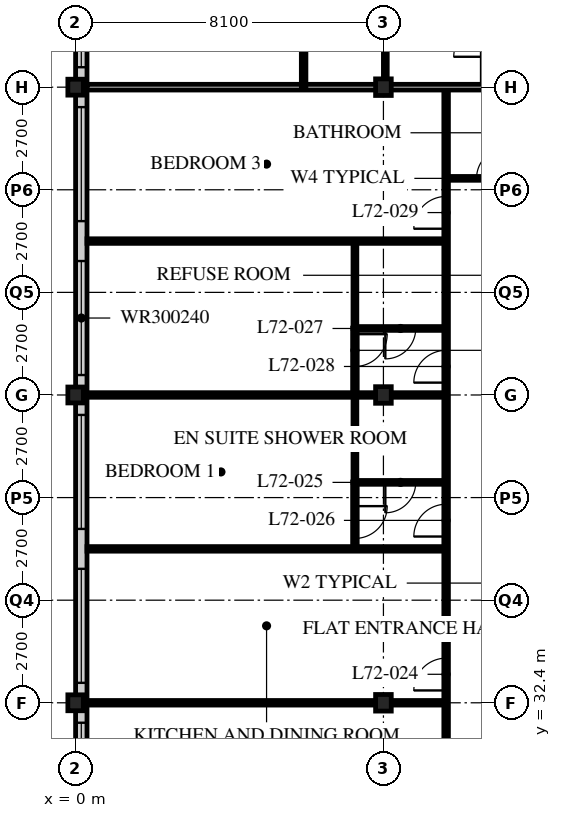
"""IFC4 building model, lengths in metres.
Left out: names, types, materials, properties, quantities, classifications, styles, units other than length and angle.
Written with IfcOpenShell. Run it as: python <this file> out.ifc"""

import sys

from ifc_helpers import new_model, si_unit, direction, frame, frame_2d, origin, origin_2d, place, context, subcontext, project, spatial, rectangle, i_section, extrude, element, fill, save


model = new_model("IFC4")
c1 = context("Model", 3, precision=1e-05, world=origin(), true_north=direction((0.0, 1.0)))
c2 = subcontext(c1, "Body", "Model", "MODEL_VIEW")
j1 = project(units=[si_unit("LENGTHUNIT", "METRE"), si_unit("PLANEANGLEUNIT", "RADIAN")], contexts=[c1])
p1 = place(None, origin())
s1 = spatial("IfcSite", under=j1, at=p1, CompositionType="ELEMENT")
p2 = place(p1, origin())
s2 = spatial("IfcBuilding", under=s1, at=p2, CompositionType="ELEMENT")
p3 = place(p2, frame((0.0, 0.0, 281.4)))
s3 = spatial("IfcBuildingStorey", under=s2, at=p3, CompositionType="ELEMENT", Elevation=281.4)
for number, where, z_axis, x_axis in (
    (1, (0.0, 32.4, 0.0), (0.0, 0.0, 1.0), (1.0, 0.0, 0.0)),
    (2, (0.0, 40.5, 0.0), (0.0, 0.0, 1.0), (1.0, 0.0, 0.0)),
    (3, (0.0, 48.6, 0.0), (0.0, 0.0, 1.0), (1.0, 0.0, 0.0)),
):
    element("IfcColumn", number, at=place(p3, frame(where, z_axis=z_axis, x_axis=x_axis)), inside=s3, PredefinedType="COLUMN", context=c2, shape_type="SweptSolid", body=[
        extrude(i_section(OverallWidth=0.407, OverallDepth=0.419, WebThickness=0.031, FlangeThickness=0.049, FilletRadius=0.015, at=origin_2d()), origin(), (0.0, 0.0, 1.0), 3.9),
    ])
for number, where, z_axis, x_axis in (
    (4, (8.1, 32.4, 0.0), (0.0, 0.0, 1.0), (1.0, 0.0, 0.0)),
    (5, (8.1, 40.5, 0.0), (0.0, 0.0, 1.0), (1.0, 0.0, 0.0)),
    (6, (8.1, 48.6, 0.0), (0.0, 0.0, 1.0), (1.0, 0.0, 0.0)),
):
    element("IfcColumn", number, at=place(p3, frame(where, z_axis=z_axis, x_axis=x_axis)), inside=s3, PredefinedType="COLUMN", context=c2, shape_type="SweptSolid", body=[
        extrude(i_section(OverallWidth=0.412, OverallDepth=0.437, WebThickness=0.036, FlangeThickness=0.058, FilletRadius=0.015, at=origin_2d()), origin(), (0.0, 0.0, 1.0), 3.9),
    ])
p4 = place(p3, frame((0.15, 56.4, 0.0), z_axis=(0.0, 0.0, 1.0), x_axis=(0.0, -1.0, 0.0)))
e7 = element("IfcWall", 7, at=p4, inside=s3, PredefinedType="SOLIDWALL", context=c2, shape_type="SweptSolid", body=[
    extrude(rectangle(XDim=32.1, YDim=0.3, at=frame_2d((16.05, 0.0))), origin(), (0.0, 0.0, 1.0), 3.69),
])
p5 = place(p4, frame((0.225, 0.0, 0.6)))
e8 = element("IfcOpeningElement", 8, at=p5, cuts=e7, PredefinedType="OPENING", context=c2, shape_type="SweptSolid", body=[
    extrude(rectangle(XDim=3.0, YDim=2.4, at=frame_2d((1.5, 1.2))), frame((0.0, 0.16, 0.0), z_axis=(0.0, -1.0, 0.0), x_axis=(1.0, 0.0, 0.0)), (0.0, 0.0, 1.0), 0.32),
])
p6 = place(p4, frame((4.275, 0.0, 0.6)))
e9 = element("IfcOpeningElement", 9, at=p6, cuts=e7, PredefinedType="OPENING", context=c2, shape_type="SweptSolid", body=[
    extrude(rectangle(XDim=3.0, YDim=2.4, at=frame_2d((1.5, 1.2))), frame((0.0, 0.16, 0.0), z_axis=(0.0, -1.0, 0.0), x_axis=(1.0, 0.0, 0.0)), (0.0, 0.0, 1.0), 0.32),
])
p7 = place(p4, frame((8.325, 0.0, 0.6)))
e10 = element("IfcOpeningElement", 10, at=p7, cuts=e7, PredefinedType="OPENING", context=c2, shape_type="SweptSolid", body=[
    extrude(rectangle(XDim=3.0, YDim=2.4, at=frame_2d((1.5, 1.2))), frame((0.0, 0.16, 0.0), z_axis=(0.0, -1.0, 0.0), x_axis=(1.0, 0.0, 0.0)), (0.0, 0.0, 1.0), 0.32),
])
p8 = place(p4, frame((12.375, 0.0, 0.6)))
e11 = element("IfcOpeningElement", 11, at=p8, cuts=e7, PredefinedType="OPENING", context=c2, shape_type="SweptSolid", body=[
    extrude(rectangle(XDim=3.0, YDim=2.4, at=frame_2d((1.5, 1.2))), frame((0.0, 0.16, 0.0), z_axis=(0.0, -1.0, 0.0), x_axis=(1.0, 0.0, 0.0)), (0.0, 0.0, 1.0), 0.32),
])
p9 = place(p4, frame((16.425, 0.0, 0.6)))
e12 = element("IfcOpeningElement", 12, at=p9, cuts=e7, PredefinedType="OPENING", context=c2, shape_type="SweptSolid", body=[
    extrude(rectangle(XDim=3.0, YDim=2.4, at=frame_2d((1.5, 1.2))), frame((0.0, 0.16, 0.0), z_axis=(0.0, -1.0, 0.0), x_axis=(1.0, 0.0, 0.0)), (0.0, 0.0, 1.0), 0.32),
])
p10 = place(p4, frame((20.475, 0.0, 0.6)))
e13 = element("IfcOpeningElement", 13, at=p10, cuts=e7, PredefinedType="OPENING", context=c2, shape_type="SweptSolid", body=[
    extrude(rectangle(XDim=3.0, YDim=2.4, at=frame_2d((1.5, 1.2))), frame((0.0, 0.16, 0.0), z_axis=(0.0, -1.0, 0.0), x_axis=(1.0, 0.0, 0.0)), (0.0, 0.0, 1.0), 0.32),
])
p11 = place(p4, frame((24.525, 0.0, 0.6)))
e14 = element("IfcOpeningElement", 14, at=p11, cuts=e7, PredefinedType="OPENING", context=c2, shape_type="SweptSolid", body=[
    extrude(rectangle(XDim=3.0, YDim=2.4, at=frame_2d((1.5, 1.2))), frame((0.0, 0.16, 0.0), z_axis=(0.0, -1.0, 0.0), x_axis=(1.0, 0.0, 0.0)), (0.0, 0.0, 1.0), 0.32),
])
p12 = place(p4, frame((28.575, 0.0, 0.6)))
e15 = element("IfcOpeningElement", 15, at=p12, cuts=e7, PredefinedType="OPENING", context=c2, shape_type="SweptSolid", body=[
    extrude(rectangle(XDim=3.0, YDim=2.4, at=frame_2d((1.5, 1.2))), frame((0.0, 0.16, 0.0), z_axis=(0.0, -1.0, 0.0), x_axis=(1.0, 0.0, 0.0)), (0.0, 0.0, 1.0), 0.32),
])
p13 = place(p3, frame((9.75, 22.5, 0.0), z_axis=(0.0, 0.0, 1.0), x_axis=(0.0, 1.0, 0.0)))
e16 = element("IfcWall", 16, at=p13, inside=s3, PredefinedType="PARTITIONING", context=c2, shape_type="SweptSolid", body=[
    extrude(rectangle(XDim=26.1, YDim=0.12, at=frame_2d((13.05, 0.0))), origin(), (0.0, 0.0, 1.0), 3.69),
])
p14 = place(p13, frame((0.975, 0.0, 0.0)))
e17 = element("IfcOpeningElement", 17, at=p14, cuts=e16, PredefinedType="OPENING", context=c2, shape_type="SweptSolid", body=[
    extrude(rectangle(XDim=0.85, YDim=2.1, at=frame_2d((0.425, 1.05))), frame((0.0, 0.07, 0.0), z_axis=(0.0, -1.0, 0.0), x_axis=(1.0, 0.0, 0.0)), (0.0, 0.0, 1.0), 0.14),
])
p15 = place(p13, frame((10.225, 0.0, 0.0)))
e18 = element("IfcOpeningElement", 18, at=p15, cuts=e16, PredefinedType="OPENING", context=c2, shape_type="SweptSolid", body=[
    extrude(rectangle(XDim=0.85, YDim=2.1, at=frame_2d((0.425, 1.05))), frame((0.0, 0.07, 0.0), z_axis=(0.0, -1.0, 0.0), x_axis=(1.0, 0.0, 0.0)), (0.0, 0.0, 1.0), 0.14),
])
p16 = place(p13, frame((14.275, 0.0, 0.0)))
e19 = element("IfcOpeningElement", 19, at=p16, cuts=e16, PredefinedType="OPENING", context=c2, shape_type="SweptSolid", body=[
    extrude(rectangle(XDim=0.85, YDim=2.1, at=frame_2d((0.425, 1.05))), frame((0.0, 0.07, 0.0), z_axis=(0.0, -1.0, 0.0), x_axis=(1.0, 0.0, 0.0)), (0.0, 0.0, 1.0), 0.14),
])
p17 = place(p13, frame((18.325, 0.0, 0.0)))
e20 = element("IfcOpeningElement", 20, at=p17, cuts=e16, PredefinedType="OPENING", context=c2, shape_type="SweptSolid", body=[
    extrude(rectangle(XDim=0.85, YDim=2.1, at=frame_2d((0.425, 1.05))), frame((0.0, 0.07, 0.0), z_axis=(0.0, -1.0, 0.0), x_axis=(1.0, 0.0, 0.0)), (0.0, 0.0, 1.0), 0.14),
])
p18 = place(p13, frame((22.375, 0.0, 0.0)))
e21 = element("IfcOpeningElement", 21, at=p18, cuts=e16, PredefinedType="OPENING", context=c2, shape_type="SweptSolid", body=[
    extrude(rectangle(XDim=0.85, YDim=2.1, at=frame_2d((0.425, 1.05))), frame((0.0, 0.07, 0.0), z_axis=(0.0, -1.0, 0.0), x_axis=(1.0, 0.0, 0.0)), (0.0, 0.0, 1.0), 0.14),
])
p19 = place(p3, frame((12.15, 46.2, 0.0), z_axis=(0.0, 0.0, 1.0), x_axis=(-1.0, 0.0, 0.0)))
e22 = element("IfcWall", 22, at=p19, inside=s3, PredefinedType="PARTITIONING", context=c2, shape_type="SweptSolid", body=[
    extrude(rectangle(XDim=2.4, YDim=0.1, at=frame_2d((1.2, 0.0))), origin(), (0.0, 0.0, 1.0), 3.69),
])
p20 = place(p19, frame((0.8, 0.0, 0.0)))
e23 = element("IfcOpeningElement", 23, at=p20, cuts=e22, PredefinedType="OPENING", context=c2, shape_type="SweptSolid", body=[
    extrude(rectangle(XDim=0.8, YDim=2.1, at=frame_2d((0.4, 1.05))), frame((0.0, 0.06, 0.0), z_axis=(0.0, -1.0, 0.0), x_axis=(1.0, 0.0, 0.0)), (0.0, 0.0, 1.0), 0.12),
])
p21 = place(p3, frame((9.75, 32.4, 0.0), z_axis=(0.0, 0.0, 1.0), x_axis=(-1.0, 0.0, 0.0)))
e24 = element("IfcWall", 24, at=p21, inside=s3, PredefinedType="PARTITIONING", context=c2, shape_type="SweptSolid", body=[
    extrude(rectangle(XDim=9.45, YDim=0.12, at=frame_2d((4.725, 0.0))), origin(), (0.0, 0.0, 1.0), 3.078),
])
p22 = place(p3, frame((9.75, 38.2, 0.0), z_axis=(0.0, 0.0, 1.0), x_axis=(-1.0, 0.0, 0.0)))
e25 = element("IfcWall", 25, at=p22, inside=s3, PredefinedType="PARTITIONING", context=c2, shape_type="SweptSolid", body=[
    extrude(rectangle(XDim=2.4, YDim=0.1, at=frame_2d((1.2, 0.0))), origin(), (0.0, 0.0, 1.0), 3.69),
])
p23 = place(p22, frame((0.8, 0.0, 0.0)))
e26 = element("IfcOpeningElement", 26, at=p23, cuts=e25, PredefinedType="OPENING", context=c2, shape_type="SweptSolid", body=[
    extrude(rectangle(XDim=0.8, YDim=2.1, at=frame_2d((0.4, 1.05))), frame((0.0, 0.06, 0.0), z_axis=(0.0, -1.0, 0.0), x_axis=(1.0, 0.0, 0.0)), (0.0, 0.0, 1.0), 0.12),
])
p24 = place(p3, frame((7.35, 38.2, 0.0), z_axis=(0.0, 0.0, 1.0), x_axis=(0.0, 1.0, 0.0)))
e27 = element("IfcWall", 27, at=p24, inside=s3, PredefinedType="PARTITIONING", context=c2, shape_type="SweptSolid", body=[
    extrude(rectangle(XDim=2.3, YDim=0.1, at=frame_2d((1.15, 0.0))), origin(), (0.0, 0.0, 1.0), 3.69),
])
p25 = place(p3, frame((9.75, 36.45, 0.0), z_axis=(0.0, 0.0, 1.0), x_axis=(-1.0, 0.0, 0.0)))
e28 = element("IfcWall", 28, at=p25, inside=s3, PredefinedType="PARTITIONING", context=c2, shape_type="SweptSolid", body=[
    extrude(rectangle(XDim=9.45, YDim=0.12, at=frame_2d((4.725, 0.0))), origin(), (0.0, 0.0, 1.0), 3.69),
])
p26 = place(p3, frame((9.75, 42.25, 0.0), z_axis=(0.0, 0.0, 1.0), x_axis=(-1.0, 0.0, 0.0)))
e29 = element("IfcWall", 29, at=p26, inside=s3, PredefinedType="PARTITIONING", context=c2, shape_type="SweptSolid", body=[
    extrude(rectangle(XDim=2.4, YDim=0.1, at=frame_2d((1.2, 0.0))), origin(), (0.0, 0.0, 1.0), 3.69),
])
p27 = place(p26, frame((0.8, 0.0, 0.0)))
e30 = element("IfcOpeningElement", 30, at=p27, cuts=e29, PredefinedType="OPENING", context=c2, shape_type="SweptSolid", body=[
    extrude(rectangle(XDim=0.8, YDim=2.1, at=frame_2d((0.4, 1.05))), frame((0.0, 0.06, 0.0), z_axis=(0.0, -1.0, 0.0), x_axis=(1.0, 0.0, 0.0)), (0.0, 0.0, 1.0), 0.12),
])
p28 = place(p3, frame((7.35, 42.25, 0.0), z_axis=(0.0, 0.0, 1.0), x_axis=(0.0, 1.0, 0.0)))
e31 = element("IfcWall", 31, at=p28, inside=s3, PredefinedType="PARTITIONING", context=c2, shape_type="SweptSolid", body=[
    extrude(rectangle(XDim=2.3, YDim=0.1, at=frame_2d((1.15, 0.0))), origin(), (0.0, 0.0, 1.0), 3.69),
])
p29 = place(p3, frame((9.75, 40.5, 0.0), z_axis=(0.0, 0.0, 1.0), x_axis=(-1.0, 0.0, 0.0)))
e32 = element("IfcWall", 32, at=p29, inside=s3, PredefinedType="PARTITIONING", context=c2, shape_type="SweptSolid", body=[
    extrude(rectangle(XDim=9.45, YDim=0.12, at=frame_2d((4.725, 0.0))), origin(), (0.0, 0.0, 1.0), 3.078),
])
p30 = place(p3, frame((9.75, 44.55, 0.0), z_axis=(0.0, 0.0, 1.0), x_axis=(-1.0, 0.0, 0.0)))
e33 = element("IfcWall", 33, at=p30, inside=s3, PredefinedType="PARTITIONING", context=c2, shape_type="SweptSolid", body=[
    extrude(rectangle(XDim=9.45, YDim=0.12, at=frame_2d((4.725, 0.0))), origin(), (0.0, 0.0, 1.0), 3.69),
])
p31 = place(p3, frame((8.15, 48.6, 0.0), z_axis=(0.0, 0.0, 1.0), x_axis=(0.0, 1.0, 0.0)))
e34 = element("IfcWall", 34, at=p31, inside=s3, PredefinedType="PARTITIONING", context=c2, shape_type="SweptSolid", body=[
    extrude(rectangle(XDim=2.4, YDim=0.1, at=frame_2d((1.2, 0.0))), origin(), (0.0, 0.0, 1.0), 3.078),
])
p32 = place(p3, frame((0.3, 48.6, 0.0), z_axis=(0.0, 0.0, 1.0), x_axis=(1.0, 0.0, 0.0)))
e35 = element("IfcWall", 35, at=p32, inside=s3, PredefinedType="PARTITIONING", context=c2, shape_type="SweptSolid", body=[
    extrude(rectangle(XDim=11.85, YDim=0.15, at=frame_2d((5.925, 0.0))), origin(), (0.0, 0.0, 1.0), 3.078),
])
p33 = place(p3, frame((7.35, 36.45, 0.0), z_axis=(0.0, 0.0, 1.0), x_axis=(0.0, 1.0, 0.0)))
e36 = element("IfcWall", 36, at=p33, inside=s3, PredefinedType="PARTITIONING", context=c2, shape_type="SweptSolid", body=[
    extrude(rectangle(XDim=1.76, YDim=0.12, at=frame_2d((0.88, 0.0))), origin(), (0.0, 0.0, 1.0), 3.69),
])
p34 = place(p33, frame((0.275, 0.0, 0.0)))
e37 = element("IfcOpeningElement", 37, at=p34, cuts=e36, PredefinedType="OPENING", context=c2, shape_type="SweptSolid", body=[
    extrude(rectangle(XDim=0.85, YDim=2.1, at=frame_2d((0.425, 1.05))), frame((0.0, 0.07, 0.0), z_axis=(0.0, -1.0, 0.0), x_axis=(1.0, 0.0, 0.0)), (0.0, 0.0, 1.0), 0.14),
])
p35 = place(p3, frame((7.35, 40.5, 0.0), z_axis=(0.0, 0.0, 1.0), x_axis=(0.0, 1.0, 0.0)))
e38 = element("IfcWall", 38, at=p35, inside=s3, PredefinedType="PARTITIONING", context=c2, shape_type="SweptSolid", body=[
    extrude(rectangle(XDim=1.76, YDim=0.12, at=frame_2d((0.88, 0.0))), origin(), (0.0, 0.0, 1.0), 3.69),
])
p36 = place(p35, frame((0.75, 0.0, 0.0)))
e39 = element("IfcOpeningElement", 39, at=p36, cuts=e38, PredefinedType="OPENING", context=c2, shape_type="SweptSolid", body=[
    extrude(rectangle(XDim=0.85, YDim=2.1, at=frame_2d((0.425, 1.05))), frame((0.0, 0.07, 0.0), z_axis=(0.0, -1.0, 0.0), x_axis=(1.0, 0.0, 0.0)), (0.0, 0.0, 1.0), 0.14),
])
p37 = place(p3, frame((6.0, 48.6, 0.0), z_axis=(0.0, 0.0, 1.0), x_axis=(0.0, 1.0, 0.0)))
e40 = element("IfcWall", 40, at=p37, inside=s3, PredefinedType="PARTITIONING", context=c2, shape_type="SweptSolid", body=[
    extrude(rectangle(XDim=11.85, YDim=0.12, at=frame_2d((5.925, 0.0))), origin(), (0.0, 0.0, 1.0), 3.69),
])
p38 = place(p37, frame((5.5, 0.0, 0.0)))
e41 = element("IfcOpeningElement", 41, at=p38, cuts=e40, PredefinedType="OPENING", context=c2, shape_type="SweptSolid", body=[
    extrude(rectangle(XDim=0.85, YDim=2.1, at=frame_2d((0.425, 1.05))), frame((0.0, 0.07, 0.0), z_axis=(0.0, -1.0, 0.0), x_axis=(1.0, 0.0, 0.0)), (0.0, 0.0, 1.0), 0.14),
])
p39 = place(p6, origin())
e42 = element("IfcWindow", 42, at=p39, inside=s3, PartitioningType="SINGLE_PANEL", PredefinedType="WINDOW", context=c2, shape_type="SweptSolid", body=[
    extrude(rectangle(XDim=3.0, YDim=2.4, at=frame_2d((1.5, 1.2))), frame((0.0, 0.03, 0.0), z_axis=(0.0, -1.0, 0.0), x_axis=(1.0, 0.0, 0.0)), (0.0, 0.0, 1.0), 0.06),
])
fill(e9, e42)
p40 = place(p7, origin())
e43 = element("IfcWindow", 43, at=p40, inside=s3, PartitioningType="SINGLE_PANEL", PredefinedType="WINDOW", context=c2, shape_type="SweptSolid", body=[
    extrude(rectangle(XDim=3.0, YDim=2.4, at=frame_2d((1.5, 1.2))), frame((0.0, 0.03, 0.0), z_axis=(0.0, -1.0, 0.0), x_axis=(1.0, 0.0, 0.0)), (0.0, 0.0, 1.0), 0.06),
])
fill(e10, e43)
p41 = place(p8, origin())
e44 = element("IfcWindow", 44, at=p41, inside=s3, PartitioningType="SINGLE_PANEL", PredefinedType="WINDOW", context=c2, shape_type="SweptSolid", body=[
    extrude(rectangle(XDim=3.0, YDim=2.4, at=frame_2d((1.5, 1.2))), frame((0.0, 0.03, 0.0), z_axis=(0.0, -1.0, 0.0), x_axis=(1.0, 0.0, 0.0)), (0.0, 0.0, 1.0), 0.06),
])
fill(e11, e44)
p42 = place(p9, origin())
e45 = element("IfcWindow", 45, at=p42, inside=s3, PartitioningType="SINGLE_PANEL", PredefinedType="WINDOW", context=c2, shape_type="SweptSolid", body=[
    extrude(rectangle(XDim=3.0, YDim=2.4, at=frame_2d((1.5, 1.2))), frame((0.0, 0.03, 0.0), z_axis=(0.0, -1.0, 0.0), x_axis=(1.0, 0.0, 0.0)), (0.0, 0.0, 1.0), 0.06),
])
fill(e12, e45)
p43 = place(p10, origin())
e46 = element("IfcWindow", 46, at=p43, inside=s3, PartitioningType="SINGLE_PANEL", PredefinedType="WINDOW", context=c2, shape_type="SweptSolid", body=[
    extrude(rectangle(XDim=3.0, YDim=2.4, at=frame_2d((1.5, 1.2))), frame((0.0, 0.03, 0.0), z_axis=(0.0, -1.0, 0.0), x_axis=(1.0, 0.0, 0.0)), (0.0, 0.0, 1.0), 0.06),
])
fill(e13, e46)
p44 = place(p11, origin())
e47 = element("IfcWindow", 47, at=p44, inside=s3, PartitioningType="SINGLE_PANEL", PredefinedType="WINDOW", context=c2, shape_type="SweptSolid", body=[
    extrude(rectangle(XDim=3.0, YDim=2.4, at=frame_2d((1.5, 1.2))), frame((0.0, 0.03, 0.0), z_axis=(0.0, -1.0, 0.0), x_axis=(1.0, 0.0, 0.0)), (0.0, 0.0, 1.0), 0.06),
])
fill(e14, e47)
p45 = place(p20, origin())
e48 = element("IfcDoor", 48, at=p45, inside=s3, OperationType="SINGLE_SWING_RIGHT", PredefinedType="DOOR", context=c2, shape_type="SweptSolid", body=[
    extrude(rectangle(XDim=0.8, YDim=2.1, at=frame_2d((0.4, 1.05))), frame((0.0, 0.025, 0.0), z_axis=(0.0, -1.0, 0.0), x_axis=(1.0, 0.0, 0.0)), (0.0, 0.0, 1.0), 0.05),
])
fill(e23, e48)
p46 = place(p15, origin())
e49 = element("IfcDoor", 49, at=p46, inside=s3, OperationType="SINGLE_SWING_LEFT", PredefinedType="DOOR", context=c2, shape_type="SweptSolid", body=[
    extrude(rectangle(XDim=0.85, YDim=2.1, at=frame_2d((0.425, 1.05))), frame((0.0, 0.025, 0.0), z_axis=(0.0, -1.0, 0.0), x_axis=(1.0, 0.0, 0.0)), (0.0, 0.0, 1.0), 0.05),
])
fill(e18, e49)
p47 = place(p23, origin())
e50 = element("IfcDoor", 50, at=p47, inside=s3, OperationType="SINGLE_SWING_RIGHT", PredefinedType="DOOR", context=c2, shape_type="SweptSolid", body=[
    extrude(rectangle(XDim=0.8, YDim=2.1, at=frame_2d((0.4, 1.05))), frame((0.0, 0.025, 0.0), z_axis=(0.0, -1.0, 0.0), x_axis=(1.0, 0.0, 0.0)), (0.0, 0.0, 1.0), 0.05),
])
fill(e26, e50)
p48 = place(p16, origin())
e51 = element("IfcDoor", 51, at=p48, inside=s3, OperationType="SINGLE_SWING_LEFT", PredefinedType="DOOR", context=c2, shape_type="SweptSolid", body=[
    extrude(rectangle(XDim=0.85, YDim=2.1, at=frame_2d((0.425, 1.05))), frame((0.0, 0.025, 0.0), z_axis=(0.0, -1.0, 0.0), x_axis=(1.0, 0.0, 0.0)), (0.0, 0.0, 1.0), 0.05),
])
fill(e19, e51)
p49 = place(p27, origin())
e52 = element("IfcDoor", 52, at=p49, inside=s3, OperationType="SINGLE_SWING_RIGHT", PredefinedType="DOOR", context=c2, shape_type="SweptSolid", body=[
    extrude(rectangle(XDim=0.8, YDim=2.1, at=frame_2d((0.4, 1.05))), frame((0.0, 0.025, 0.0), z_axis=(0.0, -1.0, 0.0), x_axis=(1.0, 0.0, 0.0)), (0.0, 0.0, 1.0), 0.05),
])
fill(e30, e52)
p50 = place(p17, origin())
e53 = element("IfcDoor", 53, at=p50, inside=s3, OperationType="SINGLE_SWING_LEFT", PredefinedType="DOOR", context=c2, shape_type="SweptSolid", body=[
    extrude(rectangle(XDim=0.85, YDim=2.1, at=frame_2d((0.425, 1.05))), frame((0.0, 0.025, 0.0), z_axis=(0.0, -1.0, 0.0), x_axis=(1.0, 0.0, 0.0)), (0.0, 0.0, 1.0), 0.05),
])
fill(e20, e53)
p51 = place(p18, origin())
e54 = element("IfcDoor", 54, at=p51, inside=s3, OperationType="SINGLE_SWING_LEFT", PredefinedType="DOOR", context=c2, shape_type="SweptSolid", body=[
    extrude(rectangle(XDim=0.85, YDim=2.1, at=frame_2d((0.425, 1.05))), frame((0.0, 0.025, 0.0), z_axis=(0.0, -1.0, 0.0), x_axis=(1.0, 0.0, 0.0)), (0.0, 0.0, 1.0), 0.05),
])
fill(e21, e54)
p52 = place(p34, origin())
e55 = element("IfcDoor", 55, at=p52, inside=s3, OperationType="SINGLE_SWING_LEFT", PredefinedType="DOOR", context=c2, shape_type="SweptSolid", body=[
    extrude(rectangle(XDim=0.85, YDim=2.1, at=frame_2d((0.425, 1.05))), frame((0.0, 0.025, 0.0), z_axis=(0.0, -1.0, 0.0), x_axis=(1.0, 0.0, 0.0)), (0.0, 0.0, 1.0), 0.05),
])
fill(e37, e55)
p53 = place(p36, origin())
e56 = element("IfcDoor", 56, at=p53, inside=s3, OperationType="SINGLE_SWING_LEFT", PredefinedType="DOOR", context=c2, shape_type="SweptSolid", body=[
    extrude(rectangle(XDim=0.85, YDim=2.1, at=frame_2d((0.425, 1.05))), frame((0.0, 0.025, 0.0), z_axis=(0.0, -1.0, 0.0), x_axis=(1.0, 0.0, 0.0)), (0.0, 0.0, 1.0), 0.05),
])
fill(e39, e56)
save(model, sys.argv[1])
